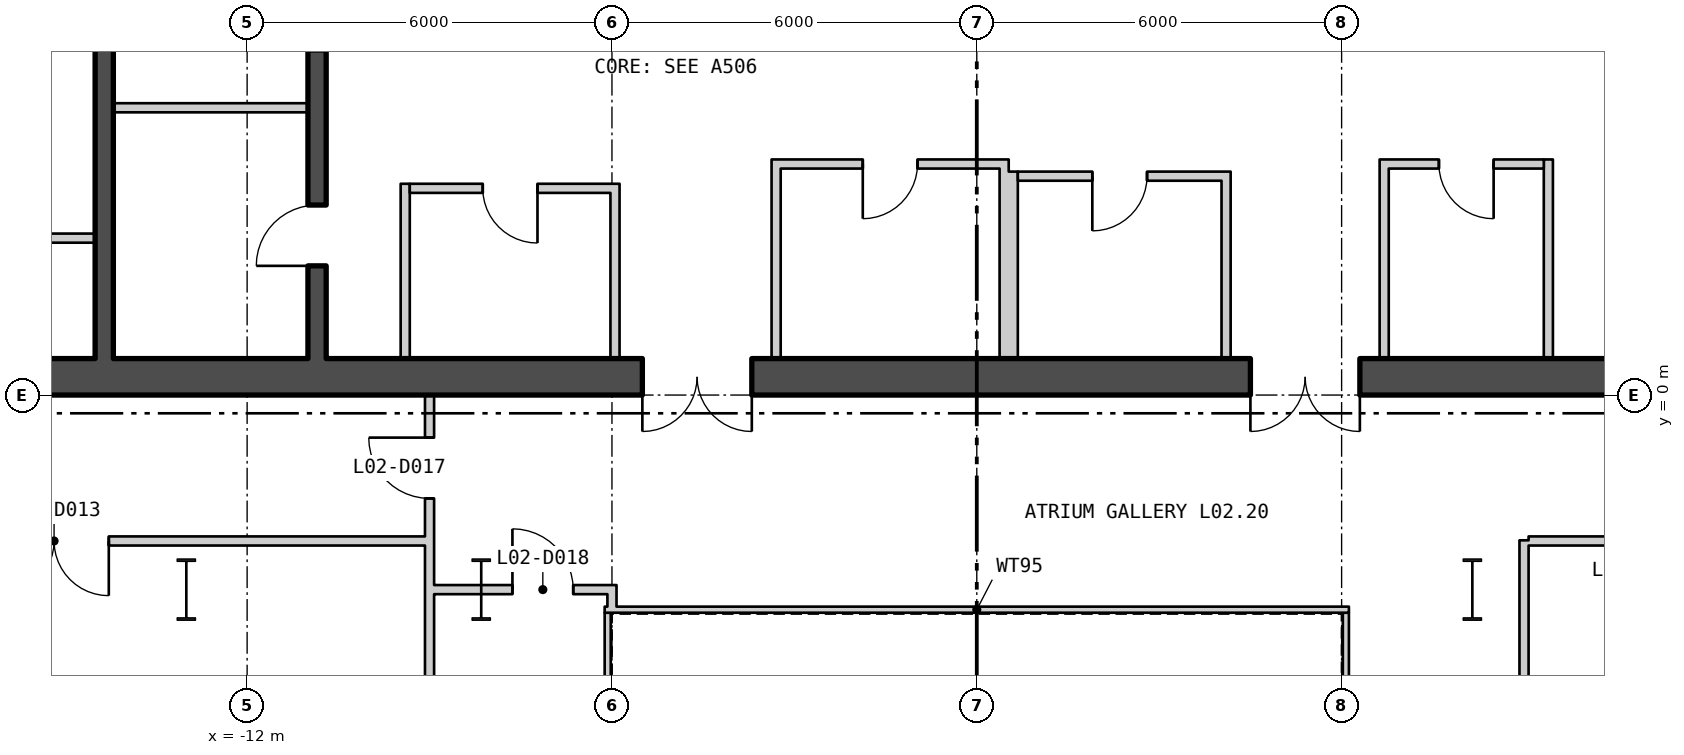
"""IFC4 building model, lengths in metres.
Left out: names, types, materials, properties, quantities, classifications, styles, units other than length and angle.
Written with IfcOpenShell. Run it as: python <this file> out.ifc"""

import sys

from ifc_helpers import new_model, si_unit, direction, frame, frame_2d, origin, origin_2d, place, context, subcontext, project, spatial, rectangle, i_section, extrude, element, fill, save


model = new_model("IFC4")
c1 = context("Model", 3, precision=1e-05, world=origin(), true_north=direction((0.0, 1.0)))
c2 = subcontext(c1, "Body", "Model", "MODEL_VIEW")
j1 = project(units=[si_unit("LENGTHUNIT", "METRE"), si_unit("PLANEANGLEUNIT", "RADIAN")], contexts=[c1])
p1 = place(None, origin())
s1 = spatial("IfcSite", under=j1, at=p1, CompositionType="ELEMENT")
p2 = place(p1, origin())
s2 = spatial("IfcBuilding", under=s1, at=p2, CompositionType="ELEMENT")
p3 = place(p2, frame((0.0, 0.0, 13.5)))
s3 = spatial("IfcBuildingStorey", under=s2, at=p3, CompositionType="ELEMENT", Elevation=13.5)
for number, where, z_axis, x_axis in (
    (1, (8.15, -3.2, 0.0), (0.0, 0.0, 1.0), (1.0, 0.0, 0.0)),
    (2, (-8.15, -3.2, 0.0), (0.0, 0.0, 1.0), (1.0, 0.0, 0.0)),
    (3, (-13.0, -3.2, 0.0), (0.0, 0.0, 1.0), (1.0, 0.0, 0.0)),
):
    element("IfcColumn", number, at=place(p3, frame(where, z_axis=z_axis, x_axis=x_axis)), inside=s3, PredefinedType="COLUMN", context=c2, shape_type="SweptSolid", body=[
        extrude(i_section(OverallWidth=0.302, OverallDepth=1.008, WebThickness=0.021, FlangeThickness=0.04, at=origin_2d()), origin(), (0.0, 0.0, 1.0), 5.1),
    ])
p4 = place(p3, frame((6.07, -11.62, 0.0), z_axis=(0.0, 0.0, 1.0), x_axis=(0.0, 1.0, 0.0)))
e4 = element("IfcWall", 4, at=p4, inside=s3, PredefinedType="PARTITIONING", context=c2, shape_type="SweptSolid", body=[
    extrude(rectangle(XDim=8.04, YDim=0.1, at=frame_2d((4.02, 0.0))), origin(), (0.0, 0.0, 1.0), 4.88),
])
p5 = place(p3, frame((6.12, -3.53, 0.0), z_axis=(0.0, 0.0, 1.0), x_axis=(-1.0, 0.0, 0.0)))
e5 = element("IfcWall", 5, at=p5, inside=s3, PredefinedType="PARTITIONING", context=c2, shape_type="SweptSolid", body=[
    extrude(rectangle(XDim=12.24, YDim=0.1, at=frame_2d((6.12, 0.0))), origin(), (0.0, 0.0, 1.0), 4.88),
])
p6 = place(p3, frame((-6.07, -3.58, 0.0), z_axis=(0.0, 0.0, 1.0), x_axis=(0.0, -1.0, 0.0)))
e6 = element("IfcWall", 6, at=p6, inside=s3, PredefinedType="PARTITIONING", context=c2, shape_type="SweptSolid", body=[
    extrude(rectangle(XDim=8.04, YDim=0.1, at=frame_2d((4.02, 0.0))), origin(), (0.0, 0.0, 1.0), 4.88),
])
p7 = place(p3, frame((-17.5, 0.3, 0.0), z_axis=(0.0, 0.0, 1.0), x_axis=(1.0, 0.0, 0.0)))
e7 = element("IfcWall", 7, at=p7, inside=s3, PredefinedType="SHEAR", context=c2, shape_type="SweptSolid", body=[
    extrude(rectangle(XDim=35.0, YDim=0.6, at=frame_2d((17.5, 0.0))), origin(), (0.0, 0.0, 1.0), 4.88),
])
p8 = place(p7, frame((12.0, 0.0, 0.0)))
e8 = element("IfcOpeningElement", 8, at=p8, cuts=e7, PredefinedType="OPENING", context=c2, shape_type="SweptSolid", body=[
    extrude(rectangle(XDim=1.8, YDim=2.4, at=frame_2d((0.9, 1.2))), frame((0.0, 0.31, 0.0), z_axis=(0.0, -1.0, 0.0), x_axis=(1.0, 0.0, 0.0)), (0.0, 0.0, 1.0), 0.62),
])
p9 = place(p7, frame((22.0, 0.0, 0.0)))
e9 = element("IfcOpeningElement", 9, at=p9, cuts=e7, PredefinedType="OPENING", context=c2, shape_type="SweptSolid", body=[
    extrude(rectangle(XDim=1.8, YDim=2.4, at=frame_2d((0.9, 1.2))), frame((0.0, 0.31, 0.0), z_axis=(0.0, -1.0, 0.0), x_axis=(1.0, 0.0, 0.0)), (0.0, 0.0, 1.0), 0.62),
])
p10 = place(p3, frame((-10.85, 0.6, 0.0), z_axis=(0.0, 0.0, 1.0), x_axis=(0.0, 1.0, 0.0)))
e10 = element("IfcWall", 10, at=p10, inside=s3, PredefinedType="SHEAR", context=c2, shape_type="SweptSolid", body=[
    extrude(rectangle(XDim=16.8, YDim=0.3, at=frame_2d((8.4, 0.0))), origin(), (0.0, 0.0, 1.0), 4.88),
])
p11 = place(p10, frame((5.075, 0.0, 0.0)))
e11 = element("IfcOpeningElement", 11, at=p11, cuts=e10, PredefinedType="OPENING", context=c2, shape_type="SweptSolid", body=[
    extrude(rectangle(XDim=1.25, YDim=2.1, at=frame_2d((0.625, 1.05))), frame((0.0, 0.16, 0.0), z_axis=(0.0, -1.0, 0.0), x_axis=(1.0, 0.0, 0.0)), (0.0, 0.0, 1.0), 0.32),
])
p12 = place(p10, frame((1.525, 0.0, 0.0)))
e12 = element("IfcOpeningElement", 12, at=p12, cuts=e10, PredefinedType="OPENING", context=c2, shape_type="SweptSolid", body=[
    extrude(rectangle(XDim=1.0, YDim=2.1, at=frame_2d((0.5, 1.05))), frame((0.0, 0.16, 0.0), z_axis=(0.0, -1.0, 0.0), x_axis=(1.0, 0.0, 0.0)), (0.0, 0.0, 1.0), 0.32),
])
p13 = place(p3, frame((-14.35, 0.6, 0.0), z_axis=(0.0, 0.0, 1.0), x_axis=(0.0, 1.0, 0.0)))
e13 = element("IfcWall", 13, at=p13, inside=s3, PredefinedType="SHEAR", context=c2, shape_type="SweptSolid", body=[
    extrude(rectangle(XDim=16.8, YDim=0.3, at=frame_2d((8.4, 0.0))), origin(), (0.0, 0.0, 1.0), 4.88),
])
p14 = place(p13, frame((5.7, 0.0, 0.0)))
e14 = element("IfcOpeningElement", 14, at=p14, cuts=e13, PredefinedType="OPENING", context=c2, shape_type="SweptSolid", body=[
    extrude(rectangle(XDim=1.5, YDim=2.1, at=frame_2d((0.75, 1.05))), frame((0.0, 0.16, 0.0), z_axis=(0.0, -1.0, 0.0), x_axis=(1.0, 0.0, 0.0)), (0.0, 0.0, 1.0), 0.32),
])
p15 = place(p3, frame((-14.2, 4.725, 0.0), z_axis=(0.0, 0.0, 1.0), x_axis=(1.0, 0.0, 0.0)))
e15 = element("IfcWall", 15, at=p15, inside=s3, PredefinedType="PARTITIONING", context=c2, shape_type="SweptSolid", body=[
    extrude(rectangle(XDim=3.2, YDim=0.15, at=frame_2d((1.6, 0.0))), origin(), (0.0, 0.0, 1.0), 4.88),
])
p16 = place(p3, frame((-16.9, 2.581, 0.0), z_axis=(0.0, 0.0, 1.0), x_axis=(1.0, 0.0, 0.0)))
e16 = element("IfcWall", 16, at=p16, inside=s3, PredefinedType="PARTITIONING", context=c2, shape_type="SweptSolid", body=[
    extrude(rectangle(XDim=2.4, YDim=0.15, at=frame_2d((1.2, 0.0))), origin(), (0.0, 0.0, 1.0), 4.88),
])
for number, where, z_axis, x_axis in (
    (17, (-9.4, 0.6, 0.0), (0.0, 0.0, 1.0), (0.0, 1.0, 0.0)),
    (18, (-5.95, 0.6, 0.0), (0.0, 0.0, 1.0), (0.0, 1.0, 0.0)),
):
    element("IfcWall", number, at=place(p3, frame(where, z_axis=z_axis, x_axis=x_axis)), inside=s3, PredefinedType="PARTITIONING", context=c2, shape_type="SweptSolid", body=[
        extrude(rectangle(XDim=2.875, YDim=0.15, at=frame_2d((1.438, 0.0))), origin(), (0.0, 0.0, 1.0), 4.88),
    ])
p17 = place(p3, frame((-9.325, 3.4, 0.0), z_axis=(0.0, 0.0, 1.0), x_axis=(1.0, 0.0, 0.0)))
e19 = element("IfcWall", 19, at=p17, inside=s3, PredefinedType="PARTITIONING", context=c2, shape_type="SweptSolid", body=[
    extrude(rectangle(XDim=3.3, YDim=0.15, at=frame_2d((1.65, 0.0))), origin(), (0.0, 0.0, 1.0), 4.88),
])
p18 = place(p17, frame((1.2, 0.0, 0.0)))
e20 = element("IfcOpeningElement", 20, at=p18, cuts=e19, PredefinedType="OPENING", context=c2, shape_type="SweptSolid", body=[
    extrude(rectangle(XDim=0.9, YDim=2.1, at=frame_2d((0.45, 1.05))), frame((0.0, 0.085, 0.0), z_axis=(0.0, -1.0, 0.0), x_axis=(1.0, 0.0, 0.0)), (0.0, 0.0, 1.0), 0.17),
])
for number, where, z_axis, x_axis in (
    (21, (-3.3, 0.6, 0.0), (0.0, 0.0, 1.0), (0.0, 1.0, 0.0)),
    (22, (0.45, 0.6, 0.0), (0.0, 0.0, 1.0), (0.0, 1.0, 0.0)),
):
    element("IfcWall", number, at=place(p3, frame(where, z_axis=z_axis, x_axis=x_axis)), inside=s3, PredefinedType="PARTITIONING", context=c2, shape_type="SweptSolid", body=[
        extrude(rectangle(XDim=3.275, YDim=0.15, at=frame_2d((1.637, 0.0))), origin(), (0.0, 0.0, 1.0), 4.88),
    ])
p19 = place(p3, frame((-3.225, 3.8, 0.0), z_axis=(0.0, 0.0, 1.0), x_axis=(1.0, 0.0, 0.0)))
e23 = element("IfcWall", 23, at=p19, inside=s3, PredefinedType="PARTITIONING", context=c2, shape_type="SweptSolid", body=[
    extrude(rectangle(XDim=3.6, YDim=0.15, at=frame_2d((1.8, 0.0))), origin(), (0.0, 0.0, 1.0), 4.88),
])
p20 = place(p19, frame((1.35, 0.0, 0.0)))
e24 = element("IfcOpeningElement", 24, at=p20, cuts=e23, PredefinedType="OPENING", context=c2, shape_type="SweptSolid", body=[
    extrude(rectangle(XDim=0.9, YDim=2.1, at=frame_2d((0.45, 1.05))), frame((0.0, 0.085, 0.0), z_axis=(0.0, -1.0, 0.0), x_axis=(1.0, 0.0, 0.0)), (0.0, 0.0, 1.0), 0.17),
])
for number, where, z_axis, x_axis in (
    (25, (0.6, 0.6, 0.0), (0.0, 0.0, 1.0), (0.0, 1.0, 0.0)),
    (26, (4.1, 0.6, 0.0), (0.0, 0.0, 1.0), (0.0, 1.0, 0.0)),
):
    element("IfcWall", number, at=place(p3, frame(where, z_axis=z_axis, x_axis=x_axis)), inside=s3, PredefinedType="PARTITIONING", context=c2, shape_type="SweptSolid", body=[
        extrude(rectangle(XDim=3.075, YDim=0.15, at=frame_2d((1.538, 0.0))), origin(), (0.0, 0.0, 1.0), 4.88),
    ])
p21 = place(p3, frame((0.675, 3.6, 0.0), z_axis=(0.0, 0.0, 1.0), x_axis=(1.0, 0.0, 0.0)))
e27 = element("IfcWall", 27, at=p21, inside=s3, PredefinedType="PARTITIONING", context=c2, shape_type="SweptSolid", body=[
    extrude(rectangle(XDim=3.35, YDim=0.15, at=frame_2d((1.675, 0.0))), origin(), (0.0, 0.0, 1.0), 4.88),
])
p22 = place(p21, frame((1.225, 0.0, 0.0)))
e28 = element("IfcOpeningElement", 28, at=p22, cuts=e27, PredefinedType="OPENING", context=c2, shape_type="SweptSolid", body=[
    extrude(rectangle(XDim=0.9, YDim=2.1, at=frame_2d((0.45, 1.05))), frame((0.0, 0.085, 0.0), z_axis=(0.0, -1.0, 0.0), x_axis=(1.0, 0.0, 0.0)), (0.0, 0.0, 1.0), 0.17),
])
for number, where, z_axis, x_axis in (
    (29, (6.7, 0.6, 0.0), (0.0, 0.0, 1.0), (0.0, 1.0, 0.0)),
    (30, (9.4, 0.6, 0.0), (0.0, 0.0, 1.0), (0.0, 1.0, 0.0)),
):
    element("IfcWall", number, at=place(p3, frame(where, z_axis=z_axis, x_axis=x_axis)), inside=s3, PredefinedType="PARTITIONING", context=c2, shape_type="SweptSolid", body=[
        extrude(rectangle(XDim=3.275, YDim=0.15, at=frame_2d((1.637, 0.0))), origin(), (0.0, 0.0, 1.0), 4.88),
    ])
p23 = place(p3, frame((6.775, 3.8, 0.0), z_axis=(0.0, 0.0, 1.0), x_axis=(1.0, 0.0, 0.0)))
e31 = element("IfcWall", 31, at=p23, inside=s3, PredefinedType="PARTITIONING", context=c2, shape_type="SweptSolid", body=[
    extrude(rectangle(XDim=2.55, YDim=0.15, at=frame_2d((1.275, 0.0))), origin(), (0.0, 0.0, 1.0), 4.88),
])
p24 = place(p23, frame((0.825, 0.0, 0.0)))
e32 = element("IfcOpeningElement", 32, at=p24, cuts=e31, PredefinedType="OPENING", context=c2, shape_type="SweptSolid", body=[
    extrude(rectangle(XDim=0.9, YDim=2.1, at=frame_2d((0.45, 1.05))), frame((0.0, 0.085, 0.0), z_axis=(0.0, -1.0, 0.0), x_axis=(1.0, 0.0, 0.0)), (0.0, 0.0, 1.0), 0.17),
])
p25 = place(p3, frame((-17.025, -2.4, 0.0), z_axis=(0.0, 0.0, 1.0), x_axis=(1.0, 0.0, 0.0)))
e33 = element("IfcWall", 33, at=p25, inside=s3, PredefinedType="PARTITIONING", context=c2, shape_type="SweptSolid", body=[
    extrude(rectangle(XDim=7.95, YDim=0.15, at=frame_2d((3.975, 0.0))), origin(), (0.0, 0.0, 1.0), 4.88),
])
p26 = place(p25, frame((0.95, 0.0, 0.0)))
e34 = element("IfcOpeningElement", 34, at=p26, cuts=e33, PredefinedType="OPENING", context=c2, shape_type="SweptSolid", body=[
    extrude(rectangle(XDim=1.8, YDim=2.1, at=frame_2d((0.9, 1.05))), frame((0.0, 0.085, 0.0), z_axis=(0.0, -1.0, 0.0), x_axis=(1.0, 0.0, 0.0)), (0.0, 0.0, 1.0), 0.17),
])
p27 = place(p3, frame((-9.0, -13.675, 0.0), z_axis=(0.0, 0.0, 1.0), x_axis=(0.0, 1.0, 0.0)))
e35 = element("IfcWall", 35, at=p27, inside=s3, PredefinedType="PARTITIONING", context=c2, shape_type="SweptSolid", body=[
    extrude(rectangle(XDim=13.675, YDim=0.15, at=frame_2d((6.838, 0.0))), origin(), (0.0, 0.0, 1.0), 4.88),
])
p28 = place(p27, frame((11.975, 0.0, 0.0)))
e36 = element("IfcOpeningElement", 36, at=p28, cuts=e35, PredefinedType="OPENING", context=c2, shape_type="SweptSolid", body=[
    extrude(rectangle(XDim=1.0, YDim=2.1, at=frame_2d((0.5, 1.05))), frame((0.0, 0.085, 0.0), z_axis=(0.0, -1.0, 0.0), x_axis=(1.0, 0.0, 0.0)), (0.0, 0.0, 1.0), 0.17),
])
p29 = place(p3, frame((-8.925, -3.2, 0.0), z_axis=(0.0, 0.0, 1.0), x_axis=(1.0, 0.0, 0.0)))
e37 = element("IfcWall", 37, at=p29, inside=s3, PredefinedType="PARTITIONING", context=c2, shape_type="SweptSolid", body=[
    extrude(rectangle(XDim=0.775, YDim=0.15, at=frame_2d((0.388, 0.0))), origin(), (0.0, 0.0, 1.0), 4.09),
])
p30 = place(p3, frame((-8.15, -3.2, 0.0), z_axis=(0.0, 0.0, 1.0), x_axis=(1.0, 0.0, 0.0)))
e38 = element("IfcWall", 38, at=p30, inside=s3, PredefinedType="PARTITIONING", context=c2, shape_type="SweptSolid", body=[
    extrude(rectangle(XDim=2.225, YDim=0.15, at=frame_2d((1.113, 0.0))), origin(), (0.0, 0.0, 1.0), 3.97),
])
p31 = place(p30, frame((0.513, 0.0, 0.0)))
e39 = element("IfcOpeningElement", 39, at=p31, cuts=e38, PredefinedType="OPENING", context=c2, shape_type="SweptSolid", body=[
    extrude(rectangle(XDim=1.0, YDim=2.1, at=frame_2d((0.5, 1.05))), frame((0.0, 0.085, 0.0), z_axis=(0.0, -1.0, 0.0), x_axis=(1.0, 0.0, 0.0)), (0.0, 0.0, 1.0), 0.17),
])
p32 = place(p3, frame((-6.0, -3.48, 0.0), z_axis=(0.0, 0.0, 1.0), x_axis=(0.0, 1.0, 0.0)))
e40 = element("IfcWall", 40, at=p32, inside=s3, PredefinedType="PARTITIONING", context=c2, shape_type="SweptSolid", body=[
    extrude(rectangle(XDim=0.205, YDim=0.15, at=frame_2d((0.102, 0.0))), origin(), (0.0, 0.0, 1.0), 4.88),
])
p33 = place(p3, frame((9.0, -13.675, 0.0), z_axis=(0.0, 0.0, 1.0), x_axis=(0.0, 1.0, 0.0)))
e41 = element("IfcWall", 41, at=p33, inside=s3, PredefinedType="PARTITIONING", context=c2, shape_type="SweptSolid", body=[
    extrude(rectangle(XDim=11.286, YDim=0.15, at=frame_2d((5.643, 0.0))), origin(), (0.0, 0.0, 1.0), 4.88),
])
p34 = place(p3, frame((9.075, -2.4, 0.0), z_axis=(0.0, 0.0, 1.0), x_axis=(1.0, 0.0, 0.0)))
e42 = element("IfcWall", 42, at=p34, inside=s3, PredefinedType="PARTITIONING", context=c2, shape_type="SweptSolid", body=[
    extrude(rectangle(XDim=7.95, YDim=0.15, at=frame_2d((3.975, 0.0))), origin(), (0.0, 0.0, 1.0), 4.88),
])
p35 = place(p34, frame((1.303, 0.0, 0.0)))
e43 = element("IfcOpeningElement", 43, at=p35, cuts=e42, PredefinedType="OPENING", context=c2, shape_type="SweptSolid", body=[
    extrude(rectangle(XDim=1.0, YDim=2.1, at=frame_2d((0.5, 1.05))), frame((0.0, 0.085, 0.0), z_axis=(0.0, -1.0, 0.0), x_axis=(1.0, 0.0, 0.0)), (0.0, 0.0, 1.0), 0.17),
])
p36 = place(p34, frame((5.279, 0.0, 0.0)))
e44 = element("IfcOpeningElement", 44, at=p36, cuts=e42, PredefinedType="OPENING", context=c2, shape_type="SweptSolid", body=[
    extrude(rectangle(XDim=1.0, YDim=2.1, at=frame_2d((0.5, 1.05))), frame((0.0, 0.085, 0.0), z_axis=(0.0, -1.0, 0.0), x_axis=(1.0, 0.0, 0.0)), (0.0, 0.0, 1.0), 0.17),
])
p37 = place(p12, origin())
e45 = element("IfcDoor", 45, at=p37, inside=s3, OperationType="SINGLE_SWING_RIGHT", PredefinedType="DOOR", context=c2, shape_type="SweptSolid", body=[
    extrude(rectangle(XDim=1.0, YDim=2.1, at=frame_2d((0.5, 1.05))), frame((0.0, 0.025, 0.0), z_axis=(0.0, -1.0, 0.0), x_axis=(1.0, 0.0, 0.0)), (0.0, 0.0, 1.0), 0.05),
])
fill(e12, e45)
p38 = place(p18, origin())
e46 = element("IfcDoor", 46, at=p38, inside=s3, OperationType="SINGLE_SWING_RIGHT", PredefinedType="DOOR", context=c2, shape_type="SweptSolid", body=[
    extrude(rectangle(XDim=0.9, YDim=2.1, at=frame_2d((0.45, 1.05))), frame((0.0, 0.025, 0.0), z_axis=(0.0, -1.0, 0.0), x_axis=(1.0, 0.0, 0.0)), (0.0, 0.0, 1.0), 0.05),
])
fill(e20, e46)
p39 = place(p20, origin())
e47 = element("IfcDoor", 47, at=p39, inside=s3, OperationType="SINGLE_SWING_LEFT", PredefinedType="DOOR", context=c2, shape_type="SweptSolid", body=[
    extrude(rectangle(XDim=0.9, YDim=2.1, at=frame_2d((0.45, 1.05))), frame((0.0, 0.025, 0.0), z_axis=(0.0, -1.0, 0.0), x_axis=(1.0, 0.0, 0.0)), (0.0, 0.0, 1.0), 0.05),
])
fill(e24, e47)
p40 = place(p22, origin())
e48 = element("IfcDoor", 48, at=p40, inside=s3, OperationType="SINGLE_SWING_LEFT", PredefinedType="DOOR", context=c2, shape_type="SweptSolid", body=[
    extrude(rectangle(XDim=0.9, YDim=2.1, at=frame_2d((0.45, 1.05))), frame((0.0, 0.025, 0.0), z_axis=(0.0, -1.0, 0.0), x_axis=(1.0, 0.0, 0.0)), (0.0, 0.0, 1.0), 0.05),
])
fill(e28, e48)
p41 = place(p24, origin())
e49 = element("IfcDoor", 49, at=p41, inside=s3, OperationType="SINGLE_SWING_RIGHT", PredefinedType="DOOR", context=c2, shape_type="SweptSolid", body=[
    extrude(rectangle(XDim=0.9, YDim=2.1, at=frame_2d((0.45, 1.05))), frame((0.0, 0.025, 0.0), z_axis=(0.0, -1.0, 0.0), x_axis=(1.0, 0.0, 0.0)), (0.0, 0.0, 1.0), 0.05),
])
fill(e32, e49)
p42 = place(p8, origin())
e50 = element("IfcDoor", 50, at=p42, inside=s3, OperationType="DOUBLE_DOOR_SINGLE_SWING", PredefinedType="DOOR", context=c2, shape_type="SweptSolid", body=[
    extrude(rectangle(XDim=1.8, YDim=2.4, at=frame_2d((0.9, 1.2))), frame((0.0, 0.025, 0.0), z_axis=(0.0, -1.0, 0.0), x_axis=(1.0, 0.0, 0.0)), (0.0, 0.0, 1.0), 0.05),
])
fill(e8, e50)
p43 = place(p9, origin())
e51 = element("IfcDoor", 51, at=p43, inside=s3, OperationType="DOUBLE_DOOR_SINGLE_SWING", PredefinedType="DOOR", context=c2, shape_type="SweptSolid", body=[
    extrude(rectangle(XDim=1.8, YDim=2.4, at=frame_2d((0.9, 1.2))), frame((0.0, 0.025, 0.0), z_axis=(0.0, -1.0, 0.0), x_axis=(1.0, 0.0, 0.0)), (0.0, 0.0, 1.0), 0.05),
])
fill(e9, e51)
p44 = place(p26, origin())
e52 = element("IfcDoor", 52, at=p44, inside=s3, OperationType="DOUBLE_DOOR_SINGLE_SWING", PredefinedType="DOOR", context=c2, shape_type="SweptSolid", body=[
    extrude(rectangle(XDim=1.8, YDim=2.1, at=frame_2d((0.9, 1.05))), frame((0.0, 0.025, 0.0), z_axis=(0.0, -1.0, 0.0), x_axis=(1.0, 0.0, 0.0)), (0.0, 0.0, 1.0), 0.05),
])
fill(e34, e52)
p45 = place(p28, origin())
e53 = element("IfcDoor", 53, at=p45, inside=s3, OperationType="SINGLE_SWING_LEFT", PredefinedType="DOOR", context=c2, shape_type="SweptSolid", body=[
    extrude(rectangle(XDim=1.0, YDim=2.1, at=frame_2d((0.5, 1.05))), frame((0.0, 0.025, 0.0), z_axis=(0.0, -1.0, 0.0), x_axis=(1.0, 0.0, 0.0)), (0.0, 0.0, 1.0), 0.05),
])
fill(e36, e53)
p46 = place(p31, origin())
e54 = element("IfcDoor", 54, at=p46, inside=s3, OperationType="SINGLE_SWING_RIGHT", PredefinedType="DOOR", context=c2, shape_type="SweptSolid", body=[
    extrude(rectangle(XDim=1.0, YDim=2.1, at=frame_2d((0.5, 1.05))), frame((0.0, 0.025, 0.0), z_axis=(0.0, -1.0, 0.0), x_axis=(1.0, 0.0, 0.0)), (0.0, 0.0, 1.0), 0.05),
])
fill(e39, e54)
save(model, sys.argv[1])
